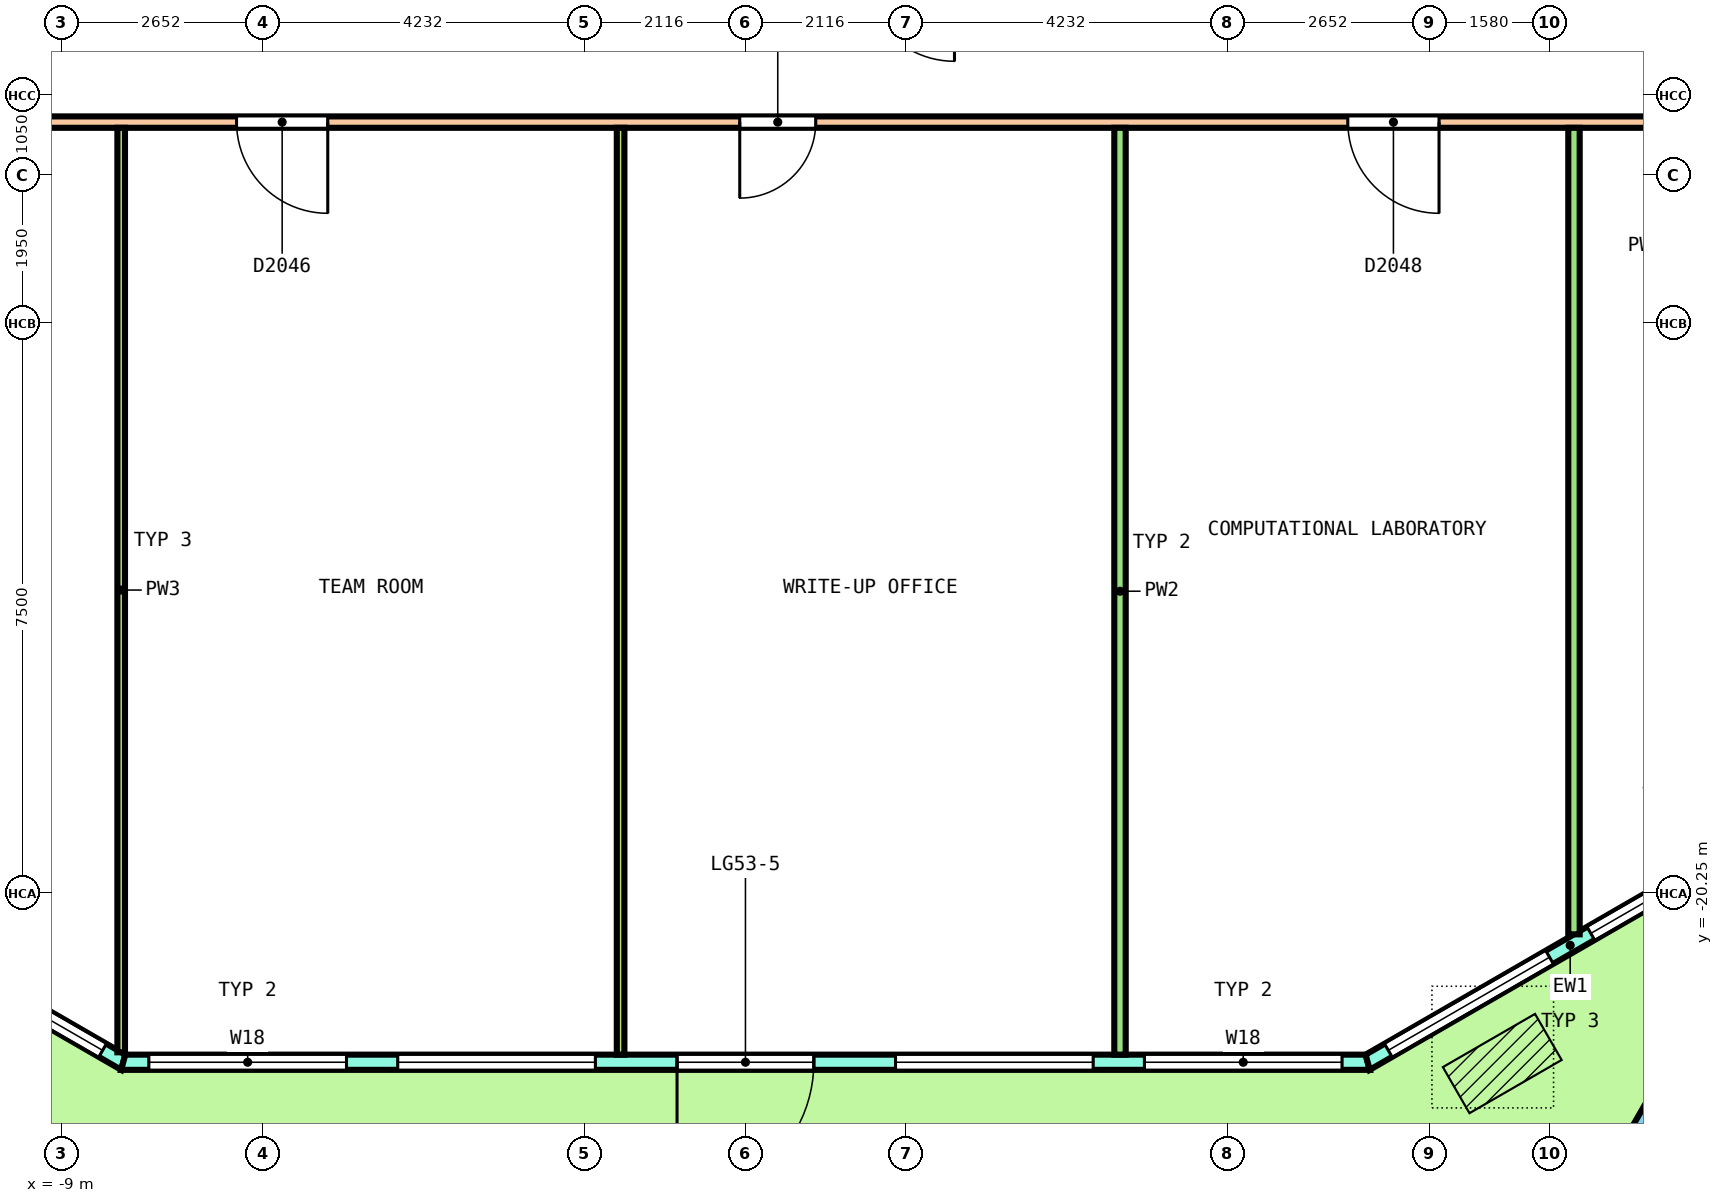
"""IFC4 building model, lengths in metres.
Left out: names, types, materials, properties, quantities, classifications, styles, units other than length and angle.
Written with IfcOpenShell. Run it as: python <this file> out.ifc"""

import sys

from ifc_helpers import new_model, si_unit, direction, frame, frame_2d, origin, origin_2d, place, context, subcontext, project, spatial, polyline, rectangle, outline, extrude, element, fill, save


model = new_model("IFC4")
c1 = context("Model", 3, precision=1e-05, world=origin(), true_north=direction((0.0, 1.0)))
c2 = subcontext(c1, "Body", "Model", "MODEL_VIEW")
j1 = project(units=[si_unit("LENGTHUNIT", "METRE"), si_unit("PLANEANGLEUNIT", "RADIAN")], contexts=[c1])
p1 = place(None, origin())
s1 = spatial("IfcSite", under=j1, at=p1, CompositionType="ELEMENT")
p2 = place(p1, origin())
s2 = spatial("IfcBuilding", under=s1, at=p2, CompositionType="ELEMENT")
p3 = place(p2, frame((0.0, 0.0, 245.4)))
s3 = spatial("IfcBuildingStorey", under=s2, at=p3, CompositionType="ELEMENT", Elevation=245.4)
p4 = place(p3, frame((12.25, -23.355, 0.0), z_axis=(-0.018113955825, -0.03141534774, 0.999342263957), x_axis=(0.86551973078, 0.499889444942, 0.031402841694)))
e1 = element("IfcColumn", 1, at=p4, inside=s3, PredefinedType="COLUMN", context=c2, shape_type="SweptSolid", body=[
    extrude(rectangle(XDim=1.05, YDim=1.05, at=origin_2d()), origin(), (0.0, 0.0, 1.0), 3.653),
])
p5 = place(p3, frame((-13.515, -19.392, 0.0), z_axis=(0.0, 0.0, 1.0), x_axis=(0.866029647142, -0.499992650217, 0.0)))
e2 = element("IfcWall", 2, at=p5, inside=s3, PredefinedType="SOLIDWALL", context=c2, shape_type="SweptSolid", body=[
    extrude(outline(polyline([(-0.027, -0.1), (1.008, -0.1), (2.042, -0.1), (3.076, -0.1), (4.111, -0.1), (5.145, -0.1), (6.18, -0.1), (6.126, 0.1), (5.109, 0.1), (4.093, 0.1), (3.076, 0.1), (2.06, 0.1), (1.043, 0.1), (0.027, 0.1), (-0.027, -0.1)])), origin(), (0.0, 0.0, 1.0), 3.7),
])
p6 = place(p5, frame((0.313, 0.0, 0.1)))
e3 = element("IfcOpeningElement", 3, at=p6, cuts=e2, PredefinedType="OPENING", context=c2, shape_type="SweptSolid", body=[
    extrude(rectangle(XDim=2.45, YDim=2.65, at=frame_2d((1.225, 1.325))), frame((0.0, 0.11, 0.0), z_axis=(0.0, -1.0, 0.0), x_axis=(1.0, 0.0, 0.0)), (0.0, 0.0, 1.0), 0.22),
])
p7 = place(p5, frame((3.39, 0.0, 0.1)))
e4 = element("IfcOpeningElement", 4, at=p7, cuts=e2, PredefinedType="OPENING", context=c2, shape_type="SweptSolid", body=[
    extrude(rectangle(XDim=2.45, YDim=2.65, at=frame_2d((1.225, 1.325))), frame((0.0, 0.11, 0.0), z_axis=(0.0, -1.0, 0.0), x_axis=(1.0, 0.0, 0.0)), (0.0, 0.0, 1.0), 0.22),
])
p8 = place(p3, frame((-8.186, -22.469, 0.0), z_axis=(0.0, 0.0, 1.0), x_axis=(1.0, 0.0, 0.0)))
e5 = element("IfcWall", 5, at=p8, inside=s3, PredefinedType="SOLIDWALL", context=c2, shape_type="SweptSolid", body=[
    extrude(outline(polyline([(-0.027, -0.1), (1.0, -0.1), (2.026, -0.1), (3.053, -0.1), (4.08, -0.1), (5.106, -0.1), (6.133, -0.1), (7.159, -0.1), (8.186, -0.1), (9.213, -0.1), (10.239, -0.1), (11.266, -0.1), (12.292, -0.1), (13.319, -0.1), (14.346, -0.1), (15.372, -0.1), (16.399, -0.1), (16.345, 0.1), (15.325, 0.1), (14.305, 0.1), (13.286, 0.1), (12.266, 0.1), (11.246, 0.1), (10.226, 0.1), (9.206, 0.1), (8.186, 0.1), (7.166, 0.1), (6.146, 0.1), (5.126, 0.1), (4.106, 0.1), (3.086, 0.1), (2.067, 0.1), (1.047, 0.1), (0.027, 0.1), (-0.027, -0.1)])), origin(), (0.0, 0.0, 1.0), 3.7),
])
p9 = place(p8, frame((0.337, 0.0, 0.1)))
e6 = element("IfcOpeningElement", 6, at=p9, cuts=e5, PredefinedType="OPENING", context=c2, shape_type="SweptSolid", body=[
    extrude(rectangle(XDim=2.6, YDim=2.65, at=frame_2d((1.3, 1.325))), frame((0.0, 0.11, 0.0), z_axis=(0.0, -1.0, 0.0), x_axis=(1.0, 0.0, 0.0)), (0.0, 0.0, 1.0), 0.22),
])
p10 = place(p8, frame((3.612, 0.0, 0.1)))
e7 = element("IfcOpeningElement", 7, at=p10, cuts=e5, PredefinedType="OPENING", context=c2, shape_type="SweptSolid", body=[
    extrude(rectangle(XDim=2.6, YDim=2.65, at=frame_2d((1.3, 1.325))), frame((0.0, 0.11, 0.0), z_axis=(0.0, -1.0, 0.0), x_axis=(1.0, 0.0, 0.0)), (0.0, 0.0, 1.0), 0.22),
])
p11 = place(p8, frame((7.286, 0.0, 0.0)))
e8 = element("IfcOpeningElement", 8, at=p11, cuts=e5, PredefinedType="OPENING", context=c2, shape_type="SweptSolid", body=[
    extrude(rectangle(XDim=1.8, YDim=2.4, at=frame_2d((0.9, 1.2))), frame((0.0, 0.11, 0.0), z_axis=(0.0, -1.0, 0.0), x_axis=(1.0, 0.0, 0.0)), (0.0, 0.0, 1.0), 0.22),
])
p12 = place(p8, frame((7.286, 0.0, 2.55)))
e9 = element("IfcOpeningElement", 9, at=p12, cuts=e5, PredefinedType="OPENING", context=c2, shape_type="SweptSolid", body=[
    extrude(rectangle(XDim=1.8, YDim=0.2, at=frame_2d((0.9, 0.1))), frame((0.0, 0.11, 0.0), z_axis=(0.0, -1.0, 0.0), x_axis=(1.0, 0.0, 0.0)), (0.0, 0.0, 1.0), 0.22),
])
p13 = place(p8, frame((10.16, 0.0, 0.1)))
e10 = element("IfcOpeningElement", 10, at=p13, cuts=e5, PredefinedType="OPENING", context=c2, shape_type="SweptSolid", body=[
    extrude(rectangle(XDim=2.6, YDim=2.65, at=frame_2d((1.3, 1.325))), frame((0.0, 0.11, 0.0), z_axis=(0.0, -1.0, 0.0), x_axis=(1.0, 0.0, 0.0)), (0.0, 0.0, 1.0), 0.22),
])
p14 = place(p8, frame((13.435, 0.0, 0.1)))
e11 = element("IfcOpeningElement", 11, at=p14, cuts=e5, PredefinedType="OPENING", context=c2, shape_type="SweptSolid", body=[
    extrude(rectangle(XDim=2.6, YDim=2.65, at=frame_2d((1.3, 1.325))), frame((0.0, 0.11, 0.0), z_axis=(0.0, -1.0, 0.0), x_axis=(1.0, 0.0, 0.0)), (0.0, 0.0, 1.0), 0.22),
])
p15 = place(p3, frame((8.186, -22.469, 0.0), z_axis=(0.0, 0.0, 1.0), x_axis=(0.866029647142, 0.499992650217, 0.0)))
e12 = element("IfcWall", 12, at=p15, inside=s3, PredefinedType="SOLIDWALL", context=c2, shape_type="SweptSolid", body=[
    extrude(outline(polyline([(-0.027, -0.1), (1.008, -0.1), (2.042, -0.1), (3.076, -0.1), (4.111, -0.1), (5.145, -0.1), (6.18, -0.1), (6.126, 0.1), (5.109, 0.1), (4.093, 0.1), (3.076, 0.1), (2.06, 0.1), (1.043, 0.1), (0.027, 0.1), (-0.027, -0.1)])), origin(), (0.0, 0.0, 1.0), 3.7),
])
p16 = place(p15, frame((0.313, 0.0, 0.1)))
e13 = element("IfcOpeningElement", 13, at=p16, cuts=e12, PredefinedType="OPENING", context=c2, shape_type="SweptSolid", body=[
    extrude(rectangle(XDim=2.45, YDim=2.65, at=frame_2d((1.225, 1.325))), frame((0.0, 0.11, 0.0), z_axis=(0.0, -1.0, 0.0), x_axis=(1.0, 0.0, 0.0)), (0.0, 0.0, 1.0), 0.22),
])
p17 = place(p15, frame((3.39, 0.0, 0.1)))
e14 = element("IfcOpeningElement", 14, at=p17, cuts=e12, PredefinedType="OPENING", context=c2, shape_type="SweptSolid", body=[
    extrude(rectangle(XDim=2.45, YDim=2.65, at=frame_2d((1.225, 1.325))), frame((0.0, 0.11, 0.0), z_axis=(0.0, -1.0, 0.0), x_axis=(1.0, 0.0, 0.0)), (0.0, 0.0, 1.0), 0.22),
])
p18 = place(p3, frame((-15.275, -10.1, 0.0), z_axis=(0.0, 0.0, 1.0), x_axis=(1.0, 0.0, 0.0)))
e15 = element("IfcWall", 15, at=p18, inside=s3, PredefinedType="PARTITIONING", context=c2, shape_type="SweptSolid", body=[
    extrude(rectangle(XDim=30.55, YDim=0.15, at=frame_2d((15.275, 0.0))), origin(), (0.0, 0.0, 1.0), 2.8),
])
p19 = place(p18, frame((3.253, 0.0, 0.0)))
e16 = element("IfcOpeningElement", 16, at=p19, cuts=e15, PredefinedType="OPENING", context=c2, shape_type="SweptSolid", body=[
    extrude(rectangle(XDim=1.2, YDim=2.1, at=frame_2d((0.6, 1.05))), frame((0.0, 0.085, 0.0), z_axis=(0.0, -1.0, 0.0), x_axis=(1.0, 0.0, 0.0)), (0.0, 0.0, 1.0), 0.17),
])
p20 = place(p18, frame((8.58, 0.0, 0.0)))
e17 = element("IfcOpeningElement", 17, at=p20, cuts=e15, PredefinedType="OPENING", context=c2, shape_type="SweptSolid", body=[
    extrude(rectangle(XDim=1.2, YDim=2.1, at=frame_2d((0.6, 1.05))), frame((0.0, 0.085, 0.0), z_axis=(0.0, -1.0, 0.0), x_axis=(1.0, 0.0, 0.0)), (0.0, 0.0, 1.0), 0.17),
])
p21 = place(p18, frame((15.2, 0.0, 0.0)))
e18 = element("IfcOpeningElement", 18, at=p21, cuts=e15, PredefinedType="OPENING", context=c2, shape_type="SweptSolid", body=[
    extrude(rectangle(XDim=1.0, YDim=2.1, at=frame_2d((0.5, 1.05))), frame((0.0, 0.085, 0.0), z_axis=(0.0, -1.0, 0.0), x_axis=(1.0, 0.0, 0.0)), (0.0, 0.0, 1.0), 0.17),
])
p22 = place(p18, frame((23.2, 0.0, 0.0)))
e19 = element("IfcOpeningElement", 19, at=p22, cuts=e15, PredefinedType="OPENING", context=c2, shape_type="SweptSolid", body=[
    extrude(rectangle(XDim=1.2, YDim=2.1, at=frame_2d((0.6, 1.05))), frame((0.0, 0.085, 0.0), z_axis=(0.0, -1.0, 0.0), x_axis=(1.0, 0.0, 0.0)), (0.0, 0.0, 1.0), 0.17),
])
p23 = place(p18, frame((28.475, 0.0, 0.0)))
e20 = element("IfcOpeningElement", 20, at=p23, cuts=e15, PredefinedType="OPENING", context=c2, shape_type="SweptSolid", body=[
    extrude(rectangle(XDim=1.0, YDim=2.1, at=frame_2d((0.5, 1.05))), frame((0.0, 0.085, 0.0), z_axis=(0.0, -1.0, 0.0), x_axis=(1.0, 0.0, 0.0)), (0.0, 0.0, 1.0), 0.17),
])
p24 = place(p3, frame((4.928, -22.368, 0.0), z_axis=(0.0, 0.0, 1.0), x_axis=(0.0, 1.0, 0.0)))
e21 = element("IfcWall", 21, at=p24, inside=s3, PredefinedType="PARTITIONING", context=c2, shape_type="SweptSolid", body=[
    extrude(rectangle(XDim=12.193, YDim=0.15, at=frame_2d((6.097, 0.0))), origin(), (0.0, 0.0, 1.0), 2.8),
])
p25 = place(p3, frame((10.9, -20.786, 0.0), z_axis=(0.0, 0.0, 1.0), x_axis=(0.0, 1.0, 0.0)))
e22 = element("IfcWall", 22, at=p25, inside=s3, PredefinedType="PARTITIONING", context=c2, shape_type="SweptSolid", body=[
    extrude(rectangle(XDim=10.611, YDim=0.15, at=frame_2d((5.305, 0.0))), origin(), (0.0, 0.0, 1.0), 2.8),
])
p26 = place(p3, frame((-8.213, -22.338, 0.0), z_axis=(0.0, 0.0, 1.0), x_axis=(0.0, 1.0, 0.0)))
e23 = element("IfcWall", 23, at=p26, inside=s3, PredefinedType="PARTITIONING", context=c2, shape_type="SweptSolid", body=[
    extrude(rectangle(XDim=12.163, YDim=0.1, at=frame_2d((6.081, 0.0))), origin(), (0.0, 0.0, 1.0), 2.8),
])
p27 = place(p3, frame((-1.643, -22.368, 0.0), z_axis=(0.0, 0.0, 1.0), x_axis=(0.0, 1.0, 0.0)))
e24 = element("IfcWall", 24, at=p27, inside=s3, PredefinedType="PARTITIONING", context=c2, shape_type="SweptSolid", body=[
    extrude(rectangle(XDim=12.193, YDim=0.1, at=frame_2d((6.097, 0.0))), origin(), (0.0, 0.0, 1.0), 2.8),
])
p28 = place(p7, origin())
e25 = element("IfcWindow", 25, at=p28, inside=s3, PartitioningType="SINGLE_PANEL", PredefinedType="WINDOW", context=c2, shape_type="SweptSolid", body=[
    extrude(rectangle(XDim=2.45, YDim=2.65, at=frame_2d((1.225, 1.325))), frame((0.0, 0.03, 0.0), z_axis=(0.0, -1.0, 0.0), x_axis=(1.0, 0.0, 0.0)), (0.0, 0.0, 1.0), 0.06),
])
fill(e4, e25)
p29 = place(p9, origin())
e26 = element("IfcWindow", 26, at=p29, inside=s3, PartitioningType="SINGLE_PANEL", PredefinedType="WINDOW", context=c2, shape_type="SweptSolid", body=[
    extrude(rectangle(XDim=2.6, YDim=2.65, at=frame_2d((1.3, 1.325))), frame((0.0, 0.03, 0.0), z_axis=(0.0, -1.0, 0.0), x_axis=(1.0, 0.0, 0.0)), (0.0, 0.0, 1.0), 0.06),
])
fill(e6, e26)
p30 = place(p10, origin())
e27 = element("IfcWindow", 27, at=p30, inside=s3, PartitioningType="SINGLE_PANEL", PredefinedType="WINDOW", context=c2, shape_type="SweptSolid", body=[
    extrude(rectangle(XDim=2.6, YDim=2.65, at=frame_2d((1.3, 1.325))), frame((0.0, 0.03, 0.0), z_axis=(0.0, -1.0, 0.0), x_axis=(1.0, 0.0, 0.0)), (0.0, 0.0, 1.0), 0.06),
])
fill(e7, e27)
p31 = place(p11, origin())
e28 = element("IfcDoor", 28, at=p31, inside=s3, OperationType="DOUBLE_DOOR_SINGLE_SWING", PredefinedType="DOOR", context=c2, shape_type="SweptSolid", body=[
    extrude(rectangle(XDim=1.8, YDim=2.4, at=frame_2d((0.9, 1.2))), frame((0.0, 0.025, 0.0), z_axis=(0.0, -1.0, 0.0), x_axis=(1.0, 0.0, 0.0)), (0.0, 0.0, 1.0), 0.05),
])
fill(e8, e28)
p32 = place(p12, origin())
e29 = element("IfcWindow", 29, at=p32, inside=s3, PartitioningType="SINGLE_PANEL", PredefinedType="WINDOW", context=c2, shape_type="SweptSolid", body=[
    extrude(rectangle(XDim=1.8, YDim=0.2, at=frame_2d((0.9, 0.1))), frame((0.0, 0.03, 0.0), z_axis=(0.0, -1.0, 0.0), x_axis=(1.0, 0.0, 0.0)), (0.0, 0.0, 1.0), 0.06),
])
fill(e9, e29)
p33 = place(p13, origin())
e30 = element("IfcWindow", 30, at=p33, inside=s3, PartitioningType="SINGLE_PANEL", PredefinedType="WINDOW", context=c2, shape_type="SweptSolid", body=[
    extrude(rectangle(XDim=2.6, YDim=2.65, at=frame_2d((1.3, 1.325))), frame((0.0, 0.03, 0.0), z_axis=(0.0, -1.0, 0.0), x_axis=(1.0, 0.0, 0.0)), (0.0, 0.0, 1.0), 0.06),
])
fill(e10, e30)
p34 = place(p14, origin())
e31 = element("IfcWindow", 31, at=p34, inside=s3, PartitioningType="SINGLE_PANEL", PredefinedType="WINDOW", context=c2, shape_type="SweptSolid", body=[
    extrude(rectangle(XDim=2.6, YDim=2.65, at=frame_2d((1.3, 1.325))), frame((0.0, 0.03, 0.0), z_axis=(0.0, -1.0, 0.0), x_axis=(1.0, 0.0, 0.0)), (0.0, 0.0, 1.0), 0.06),
])
fill(e11, e31)
p35 = place(p16, origin())
e32 = element("IfcWindow", 32, at=p35, inside=s3, PartitioningType="SINGLE_PANEL", PredefinedType="WINDOW", context=c2, shape_type="SweptSolid", body=[
    extrude(rectangle(XDim=2.45, YDim=2.65, at=frame_2d((1.225, 1.325))), frame((0.0, 0.03, 0.0), z_axis=(0.0, -1.0, 0.0), x_axis=(1.0, 0.0, 0.0)), (0.0, 0.0, 1.0), 0.06),
])
fill(e13, e32)
p36 = place(p17, origin())
e33 = element("IfcWindow", 33, at=p36, inside=s3, PartitioningType="SINGLE_PANEL", PredefinedType="WINDOW", context=c2, shape_type="SweptSolid", body=[
    extrude(rectangle(XDim=2.45, YDim=2.65, at=frame_2d((1.225, 1.325))), frame((0.0, 0.03, 0.0), z_axis=(0.0, -1.0, 0.0), x_axis=(1.0, 0.0, 0.0)), (0.0, 0.0, 1.0), 0.06),
])
fill(e14, e33)
p37 = place(p20, origin())
e34 = element("IfcDoor", 34, at=p37, inside=s3, OperationType="DOUBLE_DOOR_SINGLE_SWING", PredefinedType="DOOR", context=c2, shape_type="SweptSolid", body=[
    extrude(rectangle(XDim=1.2, YDim=2.1, at=frame_2d((0.6, 1.05))), frame((0.0, 0.025, 0.0), z_axis=(0.0, -1.0, 0.0), x_axis=(1.0, 0.0, 0.0)), (0.0, 0.0, 1.0), 0.05),
])
fill(e17, e34)
p38 = place(p21, origin())
e35 = element("IfcDoor", 35, at=p38, inside=s3, OperationType="SINGLE_SWING_RIGHT", PredefinedType="DOOR", context=c2, shape_type="SweptSolid", body=[
    extrude(rectangle(XDim=1.0, YDim=2.1, at=frame_2d((0.5, 1.05))), frame((0.0, 0.025, 0.0), z_axis=(0.0, -1.0, 0.0), x_axis=(1.0, 0.0, 0.0)), (0.0, 0.0, 1.0), 0.05),
])
fill(e18, e35)
p39 = place(p22, origin())
e36 = element("IfcDoor", 36, at=p39, inside=s3, OperationType="DOUBLE_DOOR_SINGLE_SWING", PredefinedType="DOOR", context=c2, shape_type="SweptSolid", body=[
    extrude(rectangle(XDim=1.2, YDim=2.1, at=frame_2d((0.6, 1.05))), frame((0.0, 0.025, 0.0), z_axis=(0.0, -1.0, 0.0), x_axis=(1.0, 0.0, 0.0)), (0.0, 0.0, 1.0), 0.05),
])
fill(e19, e36)
save(model, sys.argv[1])
